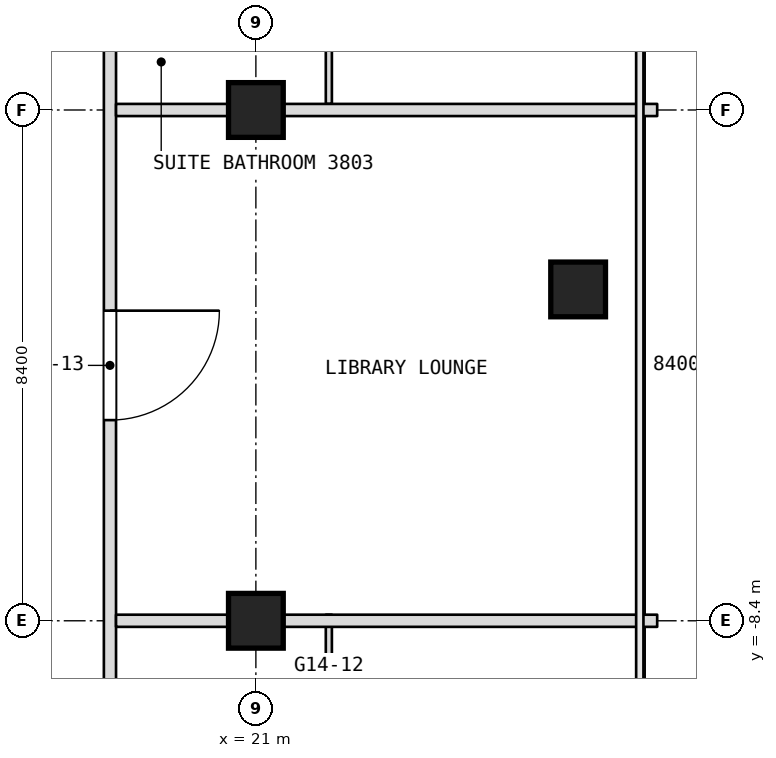
"""IFC4 building model, lengths in metres.
Left out: names, types, materials, properties, quantities, classifications, styles, units other than length and angle.
Written with IfcOpenShell. Run it as: python <this file> out.ifc"""

import sys

from ifc_helpers import new_model, si_unit, direction, frame, frame_2d, origin, origin_2d, place, context, subcontext, project, spatial, rectangle, extrude, element, fill, save


model = new_model("IFC4")
c1 = context("Model", 3, precision=1e-05, world=origin(), true_north=direction((0.0, 1.0)))
c2 = subcontext(c1, "Body", "Model", "MODEL_VIEW")
j1 = project(units=[si_unit("LENGTHUNIT", "METRE"), si_unit("PLANEANGLEUNIT", "RADIAN")], contexts=[c1])
p1 = place(None, origin())
s1 = spatial("IfcSite", under=j1, at=p1, CompositionType="ELEMENT")
p2 = place(p1, origin())
s2 = spatial("IfcBuilding", under=s1, at=p2, CompositionType="ELEMENT")
p3 = place(p2, frame((0.0, 0.0, 162.5)))
s3 = spatial("IfcBuildingStorey", under=s2, at=p3, CompositionType="ELEMENT", Elevation=162.5)
for number, where, z_axis, x_axis in (
    (1, (21.0, -8.4, 0.0), (0.0, 0.0, 1.0), (1.0, 0.0, 0.0)),
    (2, (21.0, 0.0, 0.0), (0.0, 0.0, 1.0), (1.0, 0.0, 0.0)),
    (3, (26.3, -2.951, 0.0), (0.0, 0.0, 1.0), (1.0, 0.0, 0.0)),
):
    element("IfcColumn", number, at=place(p3, frame(where, z_axis=z_axis, x_axis=x_axis)), inside=s3, PredefinedType="COLUMN", context=c2, shape_type="SweptSolid", body=[
        extrude(rectangle(XDim=0.9, YDim=0.9, at=origin_2d()), origin(), (0.0, 0.0, 1.0), 3.6),
    ])
p4 = place(p3, frame((22.2, -10.75, 0.0), z_axis=(0.0, 0.0, 1.0), x_axis=(0.0, 1.0, 0.0)))
e4 = element("IfcWall", 4, at=p4, inside=s3, PredefinedType="PARTITIONING", context=c2, shape_type="SweptSolid", body=[
    extrude(rectangle(XDim=2.45, YDim=0.1, at=frame_2d((1.225, 0.0))), origin(), (0.0, 0.0, 1.0), 3.34),
])
p5 = place(p4, frame((0.15, 0.0, 0.0)))
e5 = element("IfcOpeningElement", 5, at=p5, cuts=e4, PredefinedType="OPENING", context=c2, shape_type="SweptSolid", body=[
    extrude(rectangle(XDim=0.9, YDim=2.1, at=frame_2d((0.45, 1.05))), frame((0.0, 0.05, 0.0), z_axis=(0.0, -1.0, 0.0), x_axis=(1.0, 0.0, 0.0)), (0.0, 0.0, 1.0), 0.1),
])
p6 = place(p3, frame((22.2, 0.1, 0.0), z_axis=(0.0, 0.0, 1.0), x_axis=(0.0, 1.0, 0.0)))
e6 = element("IfcWall", 6, at=p6, inside=s3, PredefinedType="PARTITIONING", context=c2, shape_type="SweptSolid", body=[
    extrude(rectangle(XDim=2.35, YDim=0.1, at=frame_2d((1.175, 0.0))), origin(), (0.0, 0.0, 1.0), 3.34),
])
p7 = place(p3, frame((18.6, -21.708, 0.0), z_axis=(0.0, 0.0, 1.0), x_axis=(0.0, 1.0, 0.0)))
e7 = element("IfcWall", 7, at=p7, inside=s3, PredefinedType="PARTITIONING", context=c2, shape_type="SweptSolid", body=[
    extrude(rectangle(XDim=49.648, YDim=0.2, at=frame_2d((24.824, 0.0))), origin(), (0.0, 0.0, 1.0), 3.34),
])
p8 = place(p7, frame((2.204, 0.0, 0.0)))
e8 = element("IfcOpeningElement", 8, at=p8, cuts=e7, PredefinedType="OPENING", context=c2, shape_type="SweptSolid", body=[
    extrude(rectangle(XDim=0.9, YDim=2.1, at=frame_2d((0.45, 1.05))), frame((0.0, 0.1, 0.0), z_axis=(0.0, -1.0, 0.0), x_axis=(1.0, 0.0, 0.0)), (0.0, 0.0, 1.0), 0.2),
])
p9 = place(p7, frame((8.608, 0.0, 0.0)))
e9 = element("IfcOpeningElement", 9, at=p9, cuts=e7, PredefinedType="OPENING", context=c2, shape_type="SweptSolid", body=[
    extrude(rectangle(XDim=1.1, YDim=2.1, at=frame_2d((0.55, 1.05))), frame((0.0, 0.1, 0.0), z_axis=(0.0, -1.0, 0.0), x_axis=(1.0, 0.0, 0.0)), (0.0, 0.0, 1.0), 0.2),
])
p10 = place(p7, frame((16.608, 0.0, 0.0)))
e10 = element("IfcOpeningElement", 10, at=p10, cuts=e7, PredefinedType="OPENING", context=c2, shape_type="SweptSolid", body=[
    extrude(rectangle(XDim=1.8, YDim=2.1, at=frame_2d((0.9, 1.05))), frame((0.0, 0.1, 0.0), z_axis=(0.0, -1.0, 0.0), x_axis=(1.0, 0.0, 0.0)), (0.0, 0.0, 1.0), 0.2),
])
p11 = place(p7, frame((27.458, 0.0, 0.0)))
e11 = element("IfcOpeningElement", 11, at=p11, cuts=e7, PredefinedType="OPENING", context=c2, shape_type="SweptSolid", body=[
    extrude(rectangle(XDim=1.1, YDim=2.1, at=frame_2d((0.55, 1.05))), frame((0.0, 0.1, 0.0), z_axis=(0.0, -1.0, 0.0), x_axis=(1.0, 0.0, 0.0)), (0.0, 0.0, 1.0), 0.2),
])
p12 = place(p7, frame((30.508, 0.0, 0.0)))
e12 = element("IfcOpeningElement", 12, at=p12, cuts=e7, PredefinedType="OPENING", context=c2, shape_type="SweptSolid", body=[
    extrude(rectangle(XDim=1.0, YDim=2.1, at=frame_2d((0.5, 1.05))), frame((0.0, 0.1, 0.0), z_axis=(0.0, -1.0, 0.0), x_axis=(1.0, 0.0, 0.0)), (0.0, 0.0, 1.0), 0.2),
])
p13 = place(p7, frame((37.108, 0.0, 0.0)))
e13 = element("IfcOpeningElement", 13, at=p13, cuts=e7, PredefinedType="OPENING", context=c2, shape_type="SweptSolid", body=[
    extrude(rectangle(XDim=1.0, YDim=2.1, at=frame_2d((0.5, 1.05))), frame((0.0, 0.1, 0.0), z_axis=(0.0, -1.0, 0.0), x_axis=(1.0, 0.0, 0.0)), (0.0, 0.0, 1.0), 0.2),
])
p14 = place(p7, frame((42.608, 0.0, 0.0)))
e14 = element("IfcOpeningElement", 14, at=p14, cuts=e7, PredefinedType="OPENING", context=c2, shape_type="SweptSolid", body=[
    extrude(rectangle(XDim=1.0, YDim=2.1, at=frame_2d((0.5, 1.05))), frame((0.0, 0.1, 0.0), z_axis=(0.0, -1.0, 0.0), x_axis=(1.0, 0.0, 0.0)), (0.0, 0.0, 1.0), 0.2),
])
p15 = place(p7, frame((44.608, 0.0, 0.0)))
e15 = element("IfcOpeningElement", 15, at=p15, cuts=e7, PredefinedType="OPENING", context=c2, shape_type="SweptSolid", body=[
    extrude(rectangle(XDim=1.0, YDim=2.1, at=frame_2d((0.5, 1.05))), frame((0.0, 0.1, 0.0), z_axis=(0.0, -1.0, 0.0), x_axis=(1.0, 0.0, 0.0)), (0.0, 0.0, 1.0), 0.2),
])
for number, where, z_axis, x_axis in (
    (16, (18.7, -8.4, 0.0), (0.0, 0.0, 1.0), (1.0, 0.0, 0.0)),
    (17, (18.7, 0.0, 0.0), (0.0, 0.0, 1.0), (1.0, 0.0, 0.0)),
):
    element("IfcWall", number, at=place(p3, frame(where, z_axis=z_axis, x_axis=x_axis)), inside=s3, PredefinedType="PARTITIONING", context=c2, shape_type="SweptSolid", body=[
        extrude(rectangle(XDim=8.9, YDim=0.2, at=frame_2d((4.45, 0.0))), origin(), (0.0, 0.0, 1.0), 2.89),
    ])
p16 = place(p10, origin())
e18 = element("IfcDoor", 18, at=p16, inside=s3, OperationType="DOUBLE_DOOR_SINGLE_SWING", PredefinedType="DOOR", context=c2, shape_type="SweptSolid", body=[
    extrude(rectangle(XDim=1.8, YDim=2.1, at=frame_2d((0.9, 1.05))), frame((0.0, 0.025, 0.0), z_axis=(0.0, -1.0, 0.0), x_axis=(1.0, 0.0, 0.0)), (0.0, 0.0, 1.0), 0.05),
])
fill(e10, e18)
save(model, sys.argv[1])
